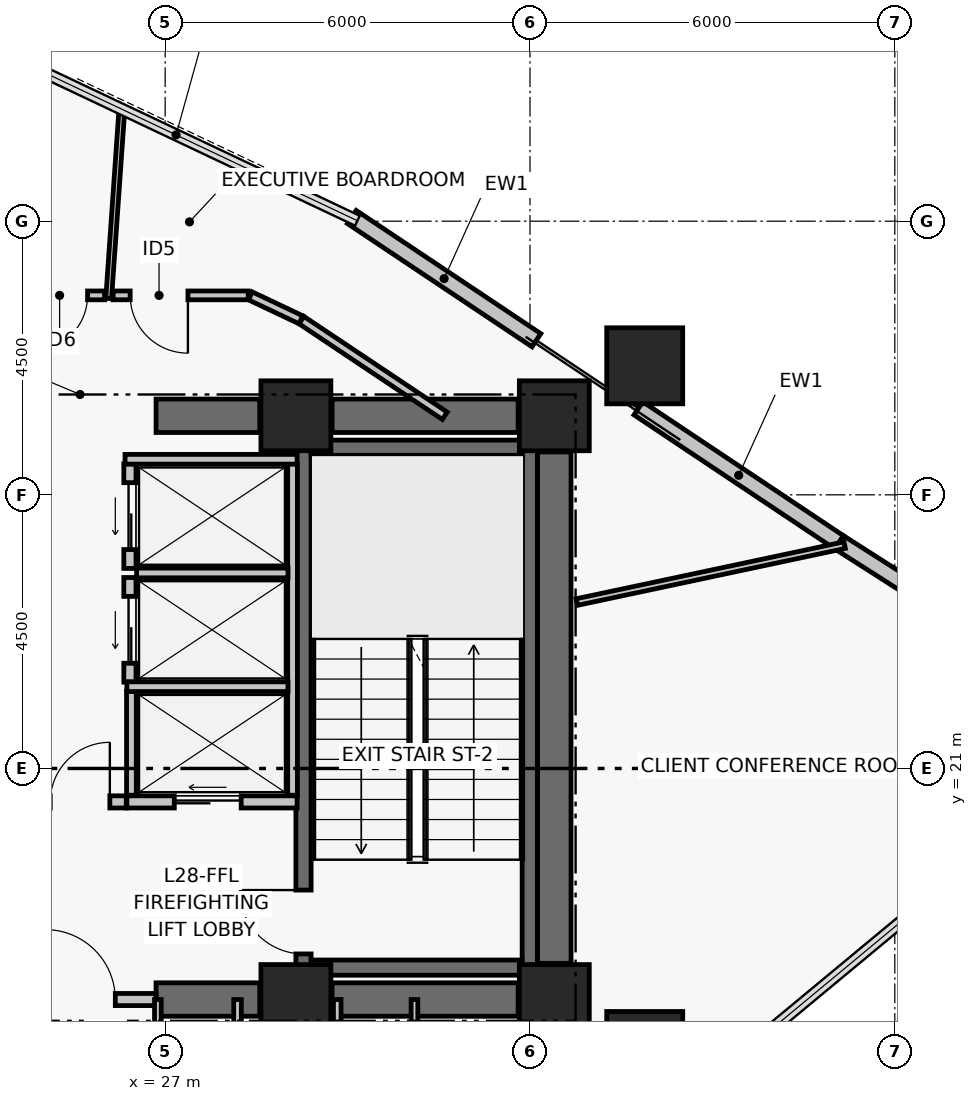
"""IFC4 building model, lengths in metres.
Left out: names, types, materials, properties, quantities, classifications, styles, units other than length and angle.
Written with IfcOpenShell. Run it as: python <this file> out.ifc"""

import sys

from ifc_helpers import new_model, si_unit, direction, frame, frame_2d, origin, origin_2d, place, context, subcontext, project, spatial, rectangle, hollow_rectangle, extrude, element, fill, save


model = new_model("IFC4")
c1 = context("Model", 3, precision=1e-05, world=origin(), true_north=direction((0.0, 1.0)))
c2 = subcontext(c1, "Body", "Model", "MODEL_VIEW")
j1 = project(units=[si_unit("LENGTHUNIT", "METRE"), si_unit("PLANEANGLEUNIT", "RADIAN")], contexts=[c1])
p1 = place(None, origin())
s1 = spatial("IfcSite", under=j1, at=p1, CompositionType="ELEMENT")
p2 = place(p1, origin())
s2 = spatial("IfcBuilding", under=s1, at=p2, CompositionType="ELEMENT")
p3 = place(p2, frame((0.0, 0.0, 115.14)))
s3 = spatial("IfcBuildingStorey", under=s2, at=p3, CompositionType="ELEMENT", Elevation=115.14)
for number, where, z_axis, x_axis in (
    (1, (29.15, 17.2, 0.0), (0.0, 0.0, 1.0), (1.0, 0.0, 0.0)),
    (2, (33.4, 17.2, 0.0), (0.0, 0.0, 1.0), (1.0, 0.0, 0.0)),
    (3, (29.15, 26.8, 0.0), (0.0, 0.0, 1.0), (1.0, 0.0, 0.0)),
    (4, (33.4, 26.8, 0.0), (0.0, 0.0, 1.0), (1.0, 0.0, 0.0)),
):
    element("IfcColumn", number, at=place(p3, frame(where, z_axis=z_axis, x_axis=x_axis)), inside=s3, PredefinedType="COLUMN", context=c2, shape_type="SweptSolid", body=[
        extrude(rectangle(XDim=1.15, YDim=1.15, at=origin_2d()), origin(), (0.0, 0.0, 1.0), 3.72),
    ])
p4 = place(p3, frame((26.85, 17.2, 0.0), z_axis=(0.0, 0.0, 1.0), x_axis=(1.0, 0.0, 0.0)))
e5 = element("IfcWall", 5, at=p4, inside=s3, PredefinedType="SHEAR", context=c2, shape_type="SweptSolid", body=[
    extrude(rectangle(XDim=1.705, YDim=0.55, at=frame_2d((0.853, 0.0))), origin(), (0.0, 0.0, 1.0), 3.44),
])
p5 = place(p3, frame((29.745, 17.2, 0.0), z_axis=(0.0, 0.0, 1.0), x_axis=(1.0, 0.0, 0.0)))
e6 = element("IfcWall", 6, at=p5, inside=s3, PredefinedType="SHEAR", context=c2, shape_type="SweptSolid", body=[
    extrude(rectangle(XDim=3.06, YDim=0.55, at=frame_2d((1.53, 0.0))), origin(), (0.0, 0.0, 1.0), 3.44),
])
p6 = place(p3, frame((26.85, 26.8, 0.0), z_axis=(0.0, 0.0, 1.0), x_axis=(1.0, 0.0, 0.0)))
e7 = element("IfcWall", 7, at=p6, inside=s3, PredefinedType="SHEAR", context=c2, shape_type="SweptSolid", body=[
    extrude(rectangle(XDim=1.705, YDim=0.55, at=frame_2d((0.853, 0.0))), origin(), (0.0, 0.0, 1.0), 3.44),
])
p7 = place(p3, frame((29.745, 26.8, 0.0), z_axis=(0.0, 0.0, 1.0), x_axis=(1.0, 0.0, 0.0)))
e8 = element("IfcWall", 8, at=p7, inside=s3, PredefinedType="SHEAR", context=c2, shape_type="SweptSolid", body=[
    extrude(rectangle(XDim=3.06, YDim=0.55, at=frame_2d((1.53, 0.0))), origin(), (0.0, 0.0, 1.0), 3.44),
])
p8 = place(p3, frame((33.4, 17.795, 0.0), z_axis=(0.0, 0.0, 1.0), x_axis=(0.0, 1.0, 0.0)))
e9 = element("IfcWall", 9, at=p8, inside=s3, PredefinedType="SHEAR", context=c2, shape_type="SweptSolid", body=[
    extrude(rectangle(XDim=8.41, YDim=0.55, at=frame_2d((4.205, 0.0))), origin(), (0.0, 0.0, 1.0), 3.44),
])
p9 = place(p3, frame((29.275, 17.6, 0.0), z_axis=(0.0, 0.0, 1.0), x_axis=(0.0, 1.0, 0.0)))
e10 = element("IfcWall", 10, at=p9, inside=s3, PredefinedType="SHEAR", context=c2, shape_type="SweptSolid", body=[
    extrude(rectangle(XDim=8.8, YDim=0.25, at=frame_2d((4.4, 0.0))), origin(), (0.0, 0.0, 1.0), 3.44),
])
p10 = place(p9, frame((0.35, 0.0, 0.0)))
e11 = element("IfcOpeningElement", 11, at=p10, cuts=e10, PredefinedType="OPENING", context=c2, shape_type="SweptSolid", body=[
    extrude(rectangle(XDim=1.05, YDim=2.08, at=frame_2d((0.525, 1.04))), frame((0.0, 0.135, 0.0), z_axis=(0.0, -1.0, 0.0), x_axis=(1.0, 0.0, 0.0)), (0.0, 0.0, 1.0), 0.27),
])
p11 = place(p3, frame((32.996, 17.6, 0.0), z_axis=(0.0, 0.0, 1.0), x_axis=(0.0, 1.0, 0.0)))
e12 = element("IfcWall", 12, at=p11, inside=s3, PredefinedType="SHEAR", context=c2, shape_type="SweptSolid", body=[
    extrude(rectangle(XDim=8.8, YDim=0.25, at=frame_2d((4.4, 0.0))), origin(), (0.0, 0.0, 1.0), 3.44),
])
for number, where, z_axis, x_axis in (
    (13, (29.4, 17.725, 0.0), (0.0, 0.0, 1.0), (1.0, 0.0, 0.0)),
    (14, (29.4, 26.275, 0.0), (0.0, 0.0, 1.0), (1.0, 0.0, 0.0)),
):
    element("IfcWall", number, at=place(p3, frame(where, z_axis=z_axis, x_axis=x_axis)), inside=s3, PredefinedType="SHEAR", context=c2, shape_type="SweptSolid", body=[
        extrude(rectangle(XDim=3.471, YDim=0.25, at=frame_2d((1.736, 0.0))), origin(), (0.0, 0.0, 1.0), 3.44),
    ])
for number, where, z_axis, x_axis in (
    (15, (34.887, 27.622, 0.0), (0.0, 0.0, 1.0), (1.0, 0.0, 0.0)),
    (16, (34.887, 16.378, 0.0), (0.0, 0.0, 1.0), (1.0, 0.0, 0.0)),
):
    element("IfcColumn", number, at=place(p3, frame(where, z_axis=z_axis, x_axis=x_axis)), inside=s3, PredefinedType="COLUMN", context=c2, shape_type="SweptSolid", body=[
        extrude(hollow_rectangle(XDim=1.25, YDim=1.25, WallThickness=0.05, at=origin_2d()), origin(), (0.0, 0.0, 1.0), 3.72),
    ])
p12 = place(p3, frame((38.072, 24.727, 0.0), z_axis=(0.0, 0.0, 1.0), x_axis=(0.843033549628, -0.537860980367, 0.0)))
e17 = element("IfcWall", 17, at=p12, inside=s3, PredefinedType="PARTITIONING", context=c2, shape_type="SweptSolid", body=[
    extrude(rectangle(XDim=3.766, YDim=0.26, at=frame_2d((1.883, 0.0))), origin(), (0.0, 0.0, 1.0), 2.87),
])
p13 = place(p3, frame((34.783, 26.922, 0.0), z_axis=(0.0, 0.0, 1.0), x_axis=(0.831718676225, -0.555197301523, 0.0)))
e18 = element("IfcWall", 18, at=p13, inside=s3, PredefinedType="PARTITIONING", context=c2, shape_type="SweptSolid", body=[
    extrude(rectangle(XDim=3.966, YDim=0.26, at=frame_2d((1.983, 0.0))), origin(), (0.0, 0.0, 1.0), 2.74),
])
p14 = place(p3, frame((30.07, 30.069, 0.0), z_axis=(0.0, 0.0, 1.0), x_axis=(0.831720838908, -0.555194061681, 0.0)))
e19 = element("IfcWall", 19, at=p14, inside=s3, PredefinedType="PARTITIONING", context=c2, shape_type="SweptSolid", body=[
    extrude(rectangle(XDim=3.65, YDim=0.26, at=frame_2d((1.825, 0.0))), origin(), (0.0, 0.0, 1.0), 2.87),
])
p15 = place(p3, frame((24.35, 17.2, 0.0), z_axis=(0.0, 0.0, 1.0), x_axis=(1.0, 0.0, 0.0)))
e20 = element("IfcWall", 20, at=p15, inside=s3, PredefinedType="PARTITIONING", context=c2, shape_type="SweptSolid", body=[
    extrude(rectangle(XDim=2.5, YDim=0.2, at=frame_2d((1.25, 0.0))), origin(), (0.0, 0.0, 1.0), 2.57),
])
p16 = place(p15, frame((0.68, 0.0, 0.0)))
e21 = element("IfcOpeningElement", 21, at=p16, cuts=e20, PredefinedType="OPENING", context=c2, shape_type="SweptSolid", body=[
    extrude(rectangle(XDim=1.15, YDim=2.08, at=frame_2d((0.575, 1.04))), frame((0.0, 0.11, 0.0), z_axis=(0.0, -1.0, 0.0), x_axis=(1.0, 0.0, 0.0)), (0.0, 0.0, 1.0), 0.22),
])
p17 = place(p3, frame((24.84, 20.45, 0.0), z_axis=(0.0, 0.0, 1.0), x_axis=(1.0, 0.0, 0.0)))
e22 = element("IfcWall", 22, at=p17, inside=s3, PredefinedType="PARTITIONING", context=c2, shape_type="SweptSolid", body=[
    extrude(rectangle(XDim=1.52, YDim=0.2, at=frame_2d((0.76, 0.0))), origin(), (0.0, 0.0, 1.0), 3.44),
])
p18 = place(p17, frame((0.27, 0.0, 0.0)))
e23 = element("IfcOpeningElement", 23, at=p18, cuts=e22, PredefinedType="OPENING", context=c2, shape_type="SweptSolid", body=[
    extrude(rectangle(XDim=0.98, YDim=2.06, at=frame_2d((0.49, 1.03))), frame((0.0, 0.11, 0.0), z_axis=(0.0, -1.0, 0.0), x_axis=(1.0, 0.0, 0.0)), (0.0, 0.0, 1.0), 0.22),
])
p19 = place(p3, frame((26.37, 20.45, 0.0), z_axis=(0.0, 0.0, 1.0), x_axis=(1.0, 0.0, 0.0)))
e24 = element("IfcWall", 24, at=p19, inside=s3, PredefinedType="PARTITIONING", context=c2, shape_type="SweptSolid", body=[
    extrude(rectangle(XDim=2.8, YDim=0.2, at=frame_2d((1.4, 0.0))), origin(), (0.0, 0.0, 1.0), 3.44),
])
p20 = place(p19, frame((0.78, 0.0, 0.0)))
e25 = element("IfcOpeningElement", 25, at=p20, cuts=e24, PredefinedType="OPENING", context=c2, shape_type="SweptSolid", body=[
    extrude(rectangle(XDim=1.1, YDim=2.08, at=frame_2d((0.55, 1.04))), frame((0.0, 0.11, 0.0), z_axis=(0.0, -1.0, 0.0), x_axis=(1.0, 0.0, 0.0)), (0.0, 0.0, 1.0), 0.22),
])
p21 = place(p3, frame((26.42, 22.42, 0.0), z_axis=(0.0, 0.0, 1.0), x_axis=(0.0, 1.0, 0.0)))
e26 = element("IfcWall", 26, at=p21, inside=s3, PredefinedType="PARTITIONING", context=c2, shape_type="SweptSolid", body=[
    extrude(rectangle(XDim=1.72, YDim=0.2, at=frame_2d((0.86, 0.0))), origin(), (0.0, 0.0, 1.0), 3.44),
])
p22 = place(p21, frame((0.31, 0.0, 0.0)))
e27 = element("IfcOpeningElement", 27, at=p22, cuts=e26, PredefinedType="OPENING", context=c2, shape_type="SweptSolid", body=[
    extrude(rectangle(XDim=1.1, YDim=2.08, at=frame_2d((0.55, 1.04))), frame((0.0, 0.11, 0.0), z_axis=(0.0, -1.0, 0.0), x_axis=(1.0, 0.0, 0.0)), (0.0, 0.0, 1.0), 0.22),
])
p23 = place(p3, frame((26.42, 24.29, 0.0), z_axis=(0.0, 0.0, 1.0), x_axis=(0.0, 1.0, 0.0)))
e28 = element("IfcWall", 28, at=p23, inside=s3, PredefinedType="PARTITIONING", context=c2, shape_type="SweptSolid", body=[
    extrude(rectangle(XDim=1.72, YDim=0.2, at=frame_2d((0.86, 0.0))), origin(), (0.0, 0.0, 1.0), 3.44),
])
p24 = place(p23, frame((0.31, 0.0, 0.0)))
e29 = element("IfcOpeningElement", 29, at=p24, cuts=e28, PredefinedType="OPENING", context=c2, shape_type="SweptSolid", body=[
    extrude(rectangle(XDim=1.1, YDim=2.08, at=frame_2d((0.55, 1.04))), frame((0.0, 0.11, 0.0), z_axis=(0.0, -1.0, 0.0), x_axis=(1.0, 0.0, 0.0)), (0.0, 0.0, 1.0), 0.22),
])
p25 = place(p3, frame((29.095, 20.56, 0.0), z_axis=(0.0, 0.0, 1.0), x_axis=(0.0, 1.0, 0.0)))
e30 = element("IfcWall", 30, at=p25, inside=s3, PredefinedType="PARTITIONING", context=c2, shape_type="SweptSolid", body=[
    extrude(rectangle(XDim=5.45, YDim=0.16, at=frame_2d((2.725, 0.0))), origin(), (0.0, 0.0, 1.0), 3.44),
])
p26 = place(p3, frame((26.445, 20.56, 0.0), z_axis=(0.0, 0.0, 1.0), x_axis=(0.0, 1.0, 0.0)))
e31 = element("IfcWall", 31, at=p26, inside=s3, PredefinedType="PARTITIONING", context=c2, shape_type="SweptSolid", body=[
    extrude(rectangle(XDim=1.71, YDim=0.16, at=frame_2d((0.855, 0.0))), origin(), (0.0, 0.0, 1.0), 3.44),
])
p27 = place(p3, frame((26.37, 22.345, 0.0), z_axis=(0.0, 0.0, 1.0), x_axis=(1.0, 0.0, 0.0)))
e32 = element("IfcWall", 32, at=p27, inside=s3, PredefinedType="PARTITIONING", context=c2, shape_type="SweptSolid", body=[
    extrude(rectangle(XDim=2.65, YDim=0.16, at=frame_2d((1.325, 0.0))), origin(), (0.0, 0.0, 1.0), 3.44),
])
p28 = place(p3, frame((26.53, 24.215, 0.0), z_axis=(0.0, 0.0, 1.0), x_axis=(1.0, 0.0, 0.0)))
e33 = element("IfcWall", 33, at=p28, inside=s3, PredefinedType="PARTITIONING", context=c2, shape_type="SweptSolid", body=[
    extrude(rectangle(XDim=2.49, YDim=0.16, at=frame_2d((1.245, 0.0))), origin(), (0.0, 0.0, 1.0), 3.44),
])
p29 = place(p3, frame((26.34, 26.085, 0.0), z_axis=(0.0, 0.0, 1.0), x_axis=(1.0, 0.0, 0.0)))
e34 = element("IfcWall", 34, at=p29, inside=s3, PredefinedType="PARTITIONING", context=c2, shape_type="SweptSolid", body=[
    extrude(rectangle(XDim=2.83, YDim=0.16, at=frame_2d((1.415, 0.0))), origin(), (0.0, 0.0, 1.0), 3.44),
])
p30 = place(p3, frame((26.88, 14.95, 0.0), z_axis=(0.0, 0.0, 1.0), x_axis=(0.0, 1.0, 0.0)))
e35 = element("IfcWall", 35, at=p30, inside=s3, PredefinedType="PARTITIONING", context=c2, shape_type="SweptSolid", body=[
    extrude(rectangle(XDim=2.25, YDim=0.11, at=frame_2d((1.125, 0.0))), origin(), (0.0, 0.0, 1.0), 2.57),
])
for number, where, z_axis, x_axis in (
    (36, (28.19, 14.95, 0.0), (0.0, 0.0, 1.0), (0.0, 1.0, 0.0)),
    (37, (29.83, 14.95, 0.0), (0.0, 0.0, 1.0), (0.0, 1.0, 0.0)),
):
    element("IfcWall", number, at=place(p3, frame(where, z_axis=z_axis, x_axis=x_axis)), inside=s3, PredefinedType="PARTITIONING", context=c2, shape_type="SweptSolid", body=[
        extrude(rectangle(XDim=2.25, YDim=0.125, at=frame_2d((1.125, 0.0))), origin(), (0.0, 0.0, 1.0), 2.57),
    ])
p31 = place(p3, frame((31.1, 14.95, 0.0), z_axis=(0.0, 0.0, 1.0), x_axis=(0.0, 1.0, 0.0)))
e38 = element("IfcWall", 38, at=p31, inside=s3, PredefinedType="PARTITIONING", context=c2, shape_type="SweptSolid", body=[
    extrude(rectangle(XDim=2.25, YDim=0.11, at=frame_2d((1.125, 0.0))), origin(), (0.0, 0.0, 1.0), 2.57),
])
p32 = place(p3, frame((31.598, 26.8, 0.0), z_axis=(0.0, 0.0, 1.0), x_axis=(-0.831758510993, 0.555137622028, 0.0)))
e39 = element("IfcWall", 39, at=p32, inside=s3, PredefinedType="PARTITIONING", context=c2, shape_type="SweptSolid", body=[
    extrude(rectangle(XDim=2.833, YDim=0.145, at=frame_2d((1.417, 0.0))), origin(), (0.0, 0.0, 1.0), 2.57),
])
p33 = place(p3, frame((29.232, 28.379, 0.0), z_axis=(0.0, 0.0, 1.0), x_axis=(-0.903829701814, 0.427892358098, 0.0)))
e40 = element("IfcWall", 40, at=p33, inside=s3, PredefinedType="PARTITIONING", context=c2, shape_type="SweptSolid", body=[
    extrude(rectangle(XDim=0.92, YDim=0.145, at=frame_2d((0.46, 0.0))), origin(), (0.0, 0.0, 1.0), 3.44),
])
p34 = place(p3, frame((28.366, 28.78, 0.0), z_axis=(0.0, 0.0, 1.0), x_axis=(-1.0, 0.0, 0.0)))
e41 = element("IfcWall", 41, at=p34, inside=s3, PredefinedType="PARTITIONING", context=c2, shape_type="SweptSolid", body=[
    extrude(rectangle(XDim=2.222, YDim=0.145, at=frame_2d((1.111, 0.0))), origin(), (0.0, 0.0, 1.0), 3.44),
])
p35 = place(p34, frame((0.992, 0.0, 0.0)))
e42 = element("IfcOpeningElement", 42, at=p35, cuts=e41, PredefinedType="OPENING", context=c2, shape_type="SweptSolid", body=[
    extrude(rectangle(XDim=0.95, YDim=2.06, at=frame_2d((0.475, 1.03))), frame((0.0, 0.083, 0.0), z_axis=(0.0, -1.0, 0.0), x_axis=(1.0, 0.0, 0.0)), (0.0, 0.0, 1.0), 0.165),
])
p36 = place(p3, frame((26.004, 28.78, 0.0), z_axis=(0.0, 0.0, 1.0), x_axis=(-1.0, 0.0, 0.0)))
e43 = element("IfcWall", 43, at=p36, inside=s3, PredefinedType="PARTITIONING", context=c2, shape_type="SweptSolid", body=[
    extrude(rectangle(XDim=10.804, YDim=0.145, at=frame_2d((5.402, 0.0))), origin(), (0.0, 0.0, 1.0), 2.62),
])
p37 = place(p36, frame((0.28, 0.0, 0.0)))
e44 = element("IfcOpeningElement", 44, at=p37, cuts=e43, PredefinedType="OPENING", context=c2, shape_type="SweptSolid", body=[
    extrude(rectangle(XDim=0.92, YDim=2.05, at=frame_2d((0.46, 1.025))), frame((0.0, 0.083, 0.0), z_axis=(0.0, -1.0, 0.0), x_axis=(1.0, 0.0, 0.0)), (0.0, 0.0, 1.0), 0.165),
])
p38 = place(p3, frame((33.77, 23.737, 0.0), z_axis=(0.0, 0.0, 1.0), x_axis=(0.978149343119, 0.207903493369, 0.0)))
e45 = element("IfcWall", 45, at=p38, inside=s3, PredefinedType="PARTITIONING", context=c2, shape_type="SweptSolid", body=[
    extrude(rectangle(XDim=4.503, YDim=0.11, at=frame_2d((2.252, 0.0))), origin(), (0.0, 0.0, 1.0), 2.57),
])
p39 = place(p3, frame((26.071, 28.73, 0.0), z_axis=(0.0, 0.0, 1.0), x_axis=(0.069744506841, 0.997564886995, 0.0)))
e46 = element("IfcWall", 46, at=p39, inside=s3, PredefinedType="PARTITIONING", context=c2, shape_type="SweptSolid", body=[
    extrude(rectangle(XDim=3.129, YDim=0.095, at=frame_2d((1.565, 0.0))), origin(), (0.0, 0.0, 1.0), 2.87),
])
p40 = place(p10, origin())
e47 = element("IfcDoor", 47, at=p40, inside=s3, OperationType="SINGLE_SWING_RIGHT", PredefinedType="DOOR", context=c2, shape_type="SweptSolid", body=[
    extrude(rectangle(XDim=1.05, YDim=2.08, at=frame_2d((0.525, 1.04))), frame((0.0, 0.025, 0.0), z_axis=(0.0, -1.0, 0.0), x_axis=(1.0, 0.0, 0.0)), (0.0, 0.0, 1.0), 0.05),
])
fill(e11, e47)
p41 = place(p16, origin())
e48 = element("IfcDoor", 48, at=p41, inside=s3, OperationType="SINGLE_SWING_LEFT", PredefinedType="DOOR", context=c2, shape_type="SweptSolid", body=[
    extrude(rectangle(XDim=1.15, YDim=2.08, at=frame_2d((0.575, 1.04))), frame((0.0, 0.025, 0.0), z_axis=(0.0, -1.0, 0.0), x_axis=(1.0, 0.0, 0.0)), (0.0, 0.0, 1.0), 0.05),
])
fill(e21, e48)
p42 = place(p18, origin())
e49 = element("IfcDoor", 49, at=p42, inside=s3, OperationType="SINGLE_SWING_RIGHT", PredefinedType="DOOR", context=c2, shape_type="SweptSolid", body=[
    extrude(rectangle(XDim=0.98, YDim=2.06, at=frame_2d((0.49, 1.03))), frame((0.0, 0.025, 0.0), z_axis=(0.0, -1.0, 0.0), x_axis=(1.0, 0.0, 0.0)), (0.0, 0.0, 1.0), 0.05),
])
fill(e23, e49)
p43 = place(p20, origin())
e50 = element("IfcDoor", 50, at=p43, inside=s3, OperationType="DOUBLE_DOOR_SLIDING", PredefinedType="DOOR", context=c2, shape_type="SweptSolid", body=[
    extrude(rectangle(XDim=1.1, YDim=2.08, at=frame_2d((0.55, 1.04))), frame((0.0, 0.025, 0.0), z_axis=(0.0, -1.0, 0.0), x_axis=(1.0, 0.0, 0.0)), (0.0, 0.0, 1.0), 0.05),
])
fill(e25, e50)
p44 = place(p22, origin())
e51 = element("IfcDoor", 51, at=p44, inside=s3, OperationType="DOUBLE_DOOR_SLIDING", PredefinedType="DOOR", context=c2, shape_type="SweptSolid", body=[
    extrude(rectangle(XDim=1.1, YDim=2.08, at=frame_2d((0.55, 1.04))), frame((0.0, 0.025, 0.0), z_axis=(0.0, -1.0, 0.0), x_axis=(1.0, 0.0, 0.0)), (0.0, 0.0, 1.0), 0.05),
])
fill(e27, e51)
p45 = place(p24, origin())
e52 = element("IfcDoor", 52, at=p45, inside=s3, OperationType="DOUBLE_DOOR_SLIDING", PredefinedType="DOOR", context=c2, shape_type="SweptSolid", body=[
    extrude(rectangle(XDim=1.1, YDim=2.08, at=frame_2d((0.55, 1.04))), frame((0.0, 0.025, 0.0), z_axis=(0.0, -1.0, 0.0), x_axis=(1.0, 0.0, 0.0)), (0.0, 0.0, 1.0), 0.05),
])
fill(e29, e52)
p46 = place(p35, origin())
e53 = element("IfcDoor", 53, at=p46, inside=s3, OperationType="SINGLE_SWING_LEFT", PredefinedType="DOOR", context=c2, shape_type="SweptSolid", body=[
    extrude(rectangle(XDim=0.95, YDim=2.06, at=frame_2d((0.475, 1.03))), frame((0.0, 0.025, 0.0), z_axis=(0.0, -1.0, 0.0), x_axis=(1.0, 0.0, 0.0)), (0.0, 0.0, 1.0), 0.05),
])
fill(e42, e53)
p47 = place(p37, origin())
e54 = element("IfcDoor", 54, at=p47, inside=s3, OperationType="SINGLE_SWING_RIGHT", PredefinedType="DOOR", context=c2, shape_type="SweptSolid", body=[
    extrude(rectangle(XDim=0.92, YDim=2.05, at=frame_2d((0.46, 1.025))), frame((0.0, 0.025, 0.0), z_axis=(0.0, -1.0, 0.0), x_axis=(1.0, 0.0, 0.0)), (0.0, 0.0, 1.0), 0.05),
])
fill(e44, e54)
save(model, sys.argv[1])
